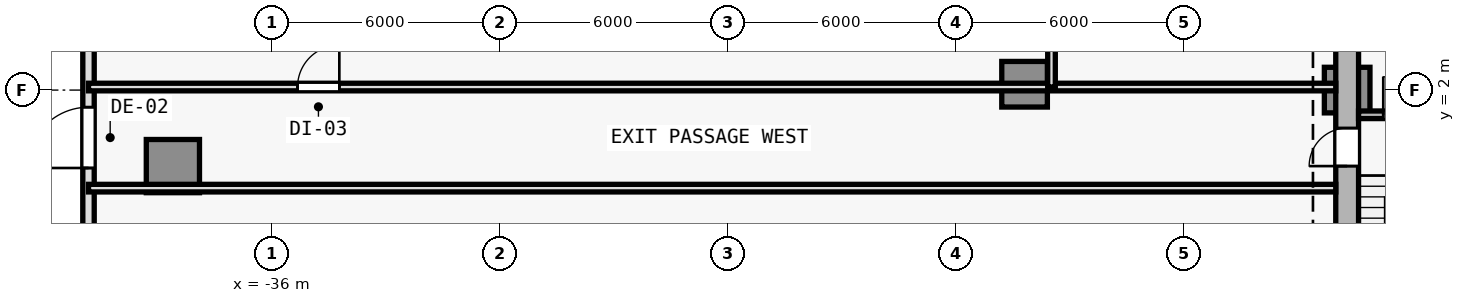
"""IFC4 building model, lengths in metres.
Left out: names, types, materials, properties, quantities, classifications, styles, units other than length and angle.
Written with IfcOpenShell. Run it as: python <this file> out.ifc"""

import sys

from ifc_helpers import new_model, si_unit, direction, frame, frame_2d, origin, origin_2d, place, context, subcontext, project, spatial, rectangle, extrude, element, fill, save


model = new_model("IFC4")
c1 = context("Model", 3, precision=1e-05, world=origin(), true_north=direction((0.0, 1.0)))
c2 = subcontext(c1, "Body", "Model", "MODEL_VIEW")
j1 = project(units=[si_unit("LENGTHUNIT", "METRE"), si_unit("PLANEANGLEUNIT", "RADIAN")], contexts=[c1])
p1 = place(None, origin())
s1 = spatial("IfcSite", under=j1, at=p1, CompositionType="ELEMENT")
p2 = place(p1, origin())
s2 = spatial("IfcBuilding", under=s1, at=p2, CompositionType="ELEMENT")
p3 = place(p2, origin())
s3 = spatial("IfcBuildingStorey", under=s2, at=p3, CompositionType="ELEMENT", Elevation=0.0)
p4 = place(p3, frame((-7.7, 2.0, 0.0), z_axis=(0.0, 0.0, 1.0), x_axis=(1.0, 0.0, 0.0)))
e1 = element("IfcColumn", 1, at=p4, inside=s3, PredefinedType="COLUMN", context=c2, shape_type="SweptSolid", body=[
    extrude(rectangle(XDim=1.2, YDim=1.2, at=origin_2d()), origin(), (0.0, 0.0, 1.0), 5.0),
])
p5 = place(p3, frame((-38.6, 0.0, 0.0), z_axis=(0.0, 0.0, 1.0), x_axis=(1.0, 0.0, 0.0)))
e2 = element("IfcColumn", 2, at=p5, inside=s3, PredefinedType="COLUMN", context=c2, shape_type="SweptSolid", body=[
    extrude(rectangle(XDim=1.4, YDim=1.4, at=origin_2d()), origin(), (0.0, 0.0, 1.0), 5.0),
])
p6 = place(p3, frame((-16.188, 2.154, 0.0), z_axis=(0.0, 0.0, 1.0), x_axis=(1.0, 0.0, 0.0)))
e3 = element("IfcColumn", 3, at=p6, inside=s3, PredefinedType="COLUMN", context=c2, shape_type="SweptSolid", body=[
    extrude(rectangle(XDim=1.2, YDim=1.2, at=origin_2d()), origin(), (0.0, 0.0, 1.0), 5.0),
])
p7 = place(p3, frame((-40.82, -21.7, 0.0), z_axis=(0.0, 0.0, 1.0), x_axis=(0.0, 1.0, 0.0)))
e4 = element("IfcWall", 4, at=p7, inside=s3, PredefinedType="SOLIDWALL", context=c2, shape_type="SweptSolid", body=[
    extrude(rectangle(XDim=39.8, YDim=0.3, at=frame_2d((19.9, 0.0))), origin(), (0.0, 0.0, 1.0), 4.72),
])
p8 = place(p7, frame((21.65, 0.0, 0.0)))
e5 = element("IfcOpeningElement", 5, at=p8, cuts=e4, PredefinedType="OPENING", context=c2, shape_type="SweptSolid", body=[
    extrude(rectangle(XDim=1.6, YDim=2.3, at=frame_2d((0.8, 1.15))), frame((0.0, 0.16, 0.0), z_axis=(0.0, -1.0, 0.0), x_axis=(1.0, 0.0, 0.0)), (0.0, 0.0, 1.0), 0.32),
])
p9 = place(p7, frame((12.5, 0.0, 0.0)))
e6 = element("IfcOpeningElement", 6, at=p9, cuts=e4, PredefinedType="OPENING", context=c2, shape_type="SweptSolid", body=[
    extrude(rectangle(XDim=2.4, YDim=2.4, at=frame_2d((1.2, 1.2))), frame((0.0, 0.16, 0.0), z_axis=(0.0, -1.0, 0.0), x_axis=(1.0, 0.0, 0.0)), (0.0, 0.0, 1.0), 0.32),
])
p10 = place(p3, frame((-7.7, -9.1, 0.0), z_axis=(0.0, 0.0, 1.0), x_axis=(0.0, 1.0, 0.0)))
e7 = element("IfcWall", 7, at=p10, inside=s3, PredefinedType="SHEAR", context=c2, shape_type="SweptSolid", body=[
    extrude(rectangle(XDim=19.0, YDim=0.6, at=frame_2d((9.5, 0.0))), origin(), (0.0, 0.0, 1.0), 4.72),
])
p11 = place(p10, frame((12.65, 0.0, 0.0)))
e8 = element("IfcOpeningElement", 8, at=p11, cuts=e7, PredefinedType="OPENING", context=c2, shape_type="SweptSolid", body=[
    extrude(rectangle(XDim=1.1, YDim=2.15, at=frame_2d((0.55, 1.075))), frame((0.0, 0.31, 0.0), z_axis=(0.0, -1.0, 0.0), x_axis=(1.0, 0.0, 0.0)), (0.0, 0.0, 1.0), 0.62),
])
p12 = place(p10, frame((9.1, 0.0, 0.0)))
e9 = element("IfcOpeningElement", 9, at=p12, cuts=e7, PredefinedType="OPENING", context=c2, shape_type="SweptSolid", body=[
    extrude(rectangle(XDim=1.0, YDim=2.15, at=frame_2d((0.5, 1.075))), frame((0.0, 0.31, 0.0), z_axis=(0.0, -1.0, 0.0), x_axis=(1.0, 0.0, 0.0)), (0.0, 0.0, 1.0), 0.62),
])
p13 = place(p3, frame((-7.4, 1.35, 0.0), z_axis=(0.0, 0.0, 1.0), x_axis=(1.0, 0.0, 0.0)))
e10 = element("IfcWall", 10, at=p13, inside=s3, PredefinedType="SOLIDWALL", context=c2, shape_type="SweptSolid", body=[
    extrude(rectangle(XDim=3.35, YDim=0.2, at=frame_2d((1.675, 0.0))), origin(), (0.0, 0.0, 1.0), 4.72),
])
p14 = place(p13, frame((0.65, 0.0, 0.0)))
e11 = element("IfcOpeningElement", 11, at=p14, cuts=e10, PredefinedType="OPENING", context=c2, shape_type="SweptSolid", body=[
    extrude(rectangle(XDim=1.0, YDim=2.15, at=frame_2d((0.5, 1.075))), frame((0.0, 0.11, 0.0), z_axis=(0.0, -1.0, 0.0), x_axis=(1.0, 0.0, 0.0)), (0.0, 0.0, 1.0), 0.22),
])
p15 = place(p3, frame((-40.82, -0.58, 0.0), z_axis=(0.0, 0.0, 1.0), x_axis=(1.0, 0.0, 0.0)))
e12 = element("IfcWall", 12, at=p15, inside=s3, PredefinedType="SOLIDWALL", context=c2, shape_type="SweptSolid", body=[
    extrude(rectangle(XDim=32.82, YDim=0.2, at=frame_2d((16.41, 0.0))), origin(), (0.0, 0.0, 1.0), 4.105),
])
p16 = place(p3, frame((-40.82, 2.08, 0.0), z_axis=(0.0, 0.0, 1.0), x_axis=(1.0, 0.0, 0.0)))
e13 = element("IfcWall", 13, at=p16, inside=s3, PredefinedType="SOLIDWALL", context=c2, shape_type="SweptSolid", body=[
    extrude(rectangle(XDim=32.82, YDim=0.2, at=frame_2d((16.41, 0.0))), origin(), (0.0, 0.0, 1.0), 3.881),
])
p17 = place(p16, frame((5.5, 0.0, 0.0)))
e14 = element("IfcOpeningElement", 14, at=p17, cuts=e13, PredefinedType="OPENING", context=c2, shape_type="SweptSolid", body=[
    extrude(rectangle(XDim=1.1, YDim=2.15, at=frame_2d((0.55, 1.075))), frame((0.0, 0.11, 0.0), z_axis=(0.0, -1.0, 0.0), x_axis=(1.0, 0.0, 0.0)), (0.0, 0.0, 1.0), 0.22),
])
p18 = place(p3, frame((-15.48, 2.08, 0.0), z_axis=(0.0, 0.0, 1.0), x_axis=(0.0, 1.0, 0.0)))
e15 = element("IfcWall", 15, at=p18, inside=s3, PredefinedType="SOLIDWALL", context=c2, shape_type="SweptSolid", body=[
    extrude(rectangle(XDim=4.4, YDim=0.2, at=frame_2d((2.2, 0.0))), origin(), (0.0, 0.0, 1.0), 3.881),
])
p19 = place(p18, frame((1.6, 0.0, 0.0)))
e16 = element("IfcOpeningElement", 16, at=p19, cuts=e15, PredefinedType="OPENING", context=c2, shape_type="SweptSolid", body=[
    extrude(rectangle(XDim=1.0, YDim=2.15, at=frame_2d((0.5, 1.075))), frame((0.0, 0.11, 0.0), z_axis=(0.0, -1.0, 0.0), x_axis=(1.0, 0.0, 0.0)), (0.0, 0.0, 1.0), 0.22),
])
p20 = place(p8, origin())
e17 = element("IfcDoor", 17, at=p20, inside=s3, OperationType="SINGLE_SWING_LEFT", PredefinedType="DOOR", context=c2, shape_type="SweptSolid", body=[
    extrude(rectangle(XDim=1.6, YDim=2.3, at=frame_2d((0.8, 1.15))), frame((0.0, 0.025, 0.0), z_axis=(0.0, -1.0, 0.0), x_axis=(1.0, 0.0, 0.0)), (0.0, 0.0, 1.0), 0.05),
])
fill(e5, e17)
p21 = place(p12, origin())
e18 = element("IfcDoor", 18, at=p21, inside=s3, OperationType="SINGLE_SWING_LEFT", PredefinedType="DOOR", context=c2, shape_type="SweptSolid", body=[
    extrude(rectangle(XDim=1.0, YDim=2.15, at=frame_2d((0.5, 1.075))), frame((0.0, 0.025, 0.0), z_axis=(0.0, -1.0, 0.0), x_axis=(1.0, 0.0, 0.0)), (0.0, 0.0, 1.0), 0.05),
])
fill(e9, e18)
p22 = place(p14, origin())
e19 = element("IfcDoor", 19, at=p22, inside=s3, OperationType="SINGLE_SWING_LEFT", PredefinedType="DOOR", context=c2, shape_type="SweptSolid", body=[
    extrude(rectangle(XDim=1.0, YDim=2.15, at=frame_2d((0.5, 1.075))), frame((0.0, 0.025, 0.0), z_axis=(0.0, -1.0, 0.0), x_axis=(1.0, 0.0, 0.0)), (0.0, 0.0, 1.0), 0.05),
])
fill(e11, e19)
p23 = place(p17, origin())
e20 = element("IfcDoor", 20, at=p23, inside=s3, OperationType="SINGLE_SWING_RIGHT", PredefinedType="DOOR", context=c2, shape_type="SweptSolid", body=[
    extrude(rectangle(XDim=1.1, YDim=2.15, at=frame_2d((0.55, 1.075))), frame((0.0, 0.025, 0.0), z_axis=(0.0, -1.0, 0.0), x_axis=(1.0, 0.0, 0.0)), (0.0, 0.0, 1.0), 0.05),
])
fill(e14, e20)
save(model, sys.argv[1])
